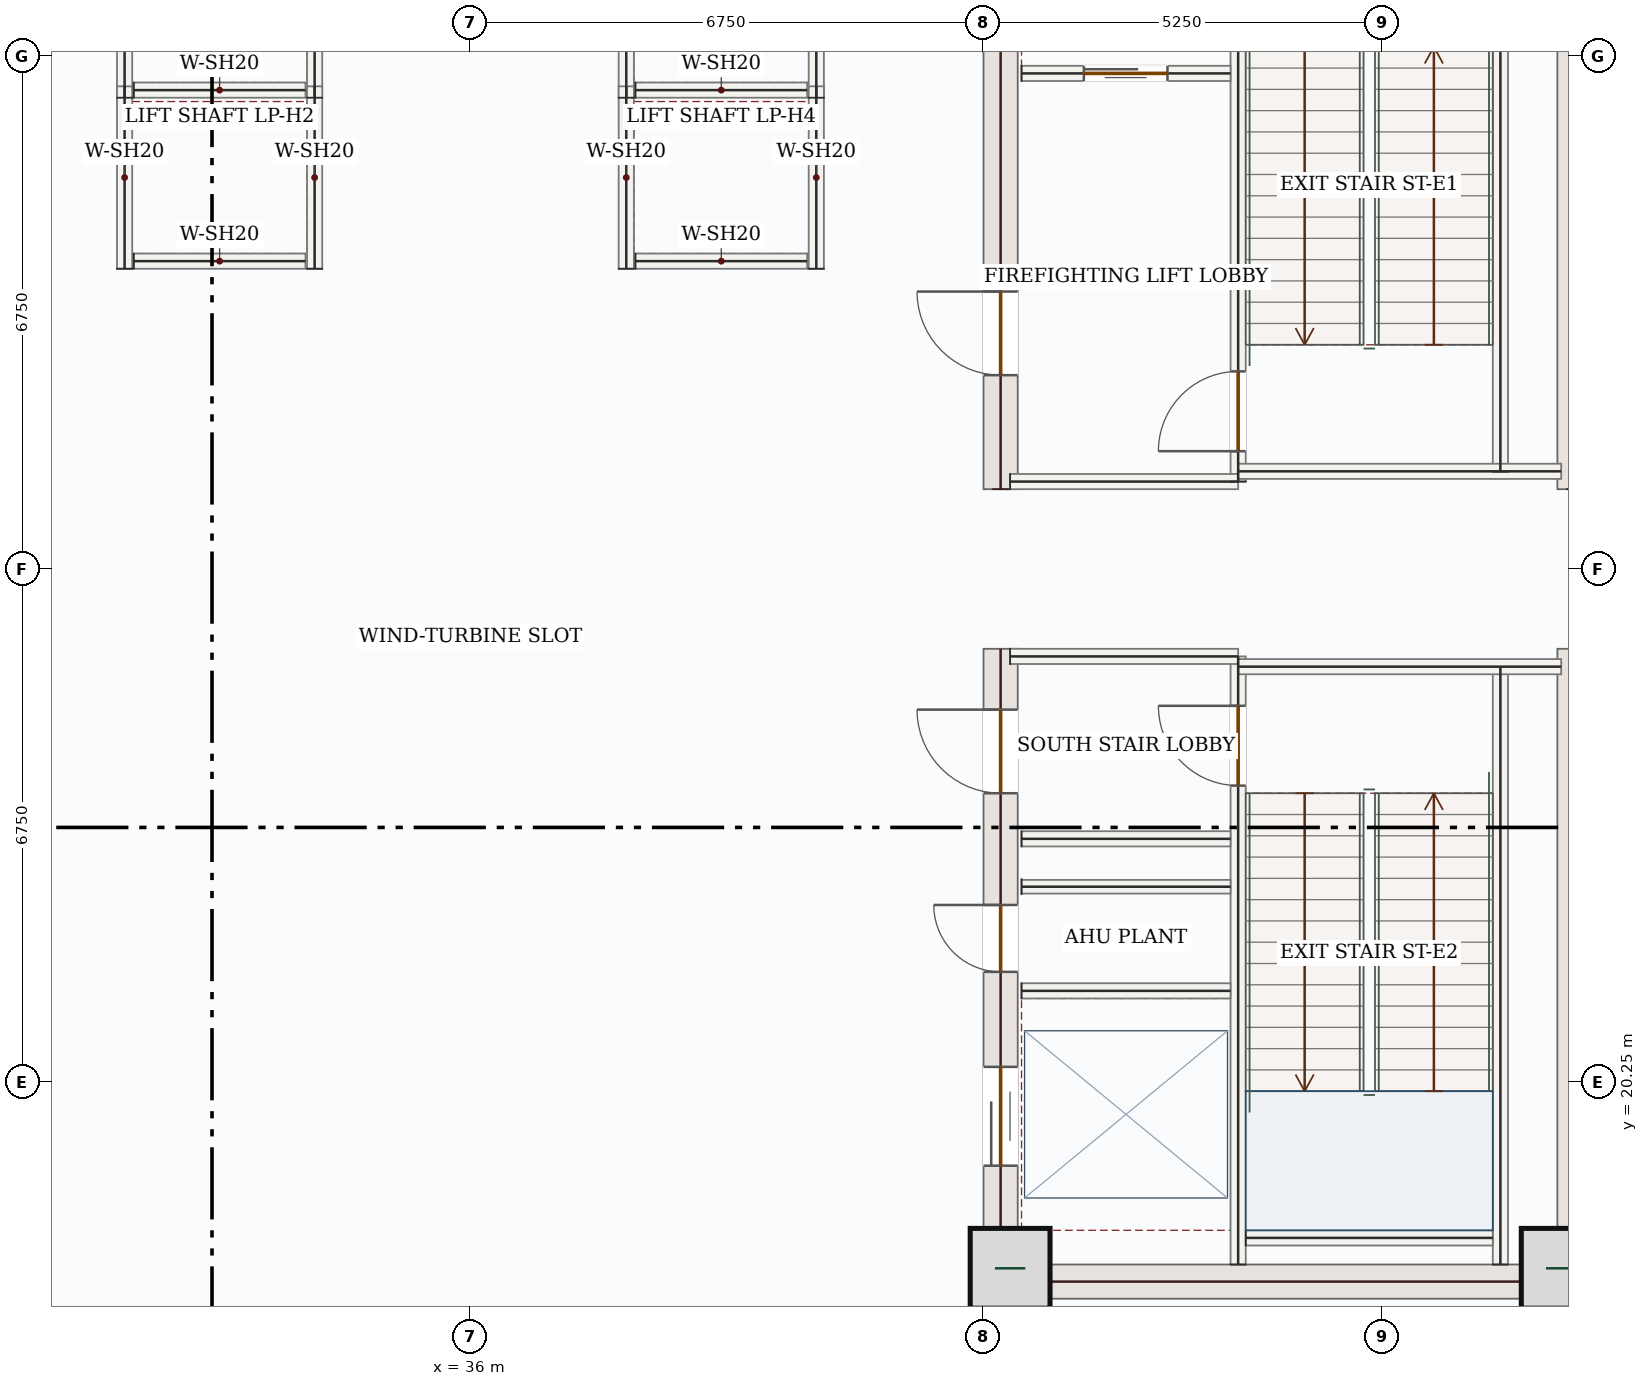
"""IFC4 building model, lengths in metres.
Left out: names, types, materials, properties, quantities, classifications, styles, units other than length and angle.
Written with IfcOpenShell. Run it as: python <this file> out.ifc"""

import sys

from ifc_helpers import new_model, si_unit, direction, frame, frame_2d, origin, origin_2d, place, context, subcontext, project, spatial, rectangle, extrude, source, transform, mapped, element, fill, save


model = new_model("IFC4")
c1 = context("Model", 3, precision=1e-05, world=origin(), true_north=direction((0.0, 1.0)))
c2 = subcontext(c1, "Body", "Model", "MODEL_VIEW")
j1 = project(units=[si_unit("LENGTHUNIT", "METRE"), si_unit("PLANEANGLEUNIT", "RADIAN")], contexts=[c1])
p1 = place(None, origin())
s1 = spatial("IfcSite", under=j1, at=p1, CompositionType="ELEMENT")
p2 = place(p1, origin())
s2 = spatial("IfcBuilding", under=s1, at=p2, CompositionType="ELEMENT")
p3 = place(p2, frame((0.0, 0.0, 314.1)))
s3 = spatial("IfcBuildingStorey", under=s2, at=p3, CompositionType="ELEMENT", Elevation=314.1)
p4 = place(p3, frame((42.975, 17.4, 0.0), z_axis=(0.0, 0.0, 1.0), x_axis=(0.0, 1.0, 0.0)))
e1 = element("IfcWall", 1, at=p4, inside=s3, PredefinedType="SHEAR", context=c2, shape_type="SweptSolid", body=[
    extrude(rectangle(XDim=8.55, YDim=0.45, at=frame_2d((4.275, 0.0))), origin(), (0.0, 0.0, 1.0), 5.45),
])
p5 = place(p4, frame((6.65, 0.0, 0.0)))
e2 = element("IfcOpeningElement", 2, at=p5, cuts=e1, PredefinedType="OPENING", context=c2, shape_type="SweptSolid", body=[
    extrude(rectangle(XDim=1.1, YDim=2.2, at=frame_2d((0.55, 1.1))), frame((0.0, 0.235, 0.0), z_axis=(0.0, -1.0, 0.0), x_axis=(1.0, 0.0, 0.0)), (0.0, 0.0, 1.0), 0.47),
])
p6 = place(p4, frame((1.75, 0.0, 0.0)))
e3 = element("IfcOpeningElement", 3, at=p6, cuts=e1, PredefinedType="OPENING", context=c2, shape_type="SweptSolid", body=[
    extrude(rectangle(XDim=1.3, YDim=2.2, at=frame_2d((0.65, 1.1))), frame((0.0, 0.235, 0.0), z_axis=(0.0, -1.0, 0.0), x_axis=(1.0, 0.0, 0.0)), (0.0, 0.0, 1.0), 0.47),
])
p7 = place(p4, frame((4.3, 0.0, 0.0)))
e4 = element("IfcOpeningElement", 4, at=p7, cuts=e1, PredefinedType="OPENING", context=c2, shape_type="SweptSolid", body=[
    extrude(rectangle(XDim=0.88, YDim=2.1, at=frame_2d((0.44, 1.05))), frame((0.0, 0.235, 0.0), z_axis=(0.0, -1.0, 0.0), x_axis=(1.0, 0.0, 0.0)), (0.0, 0.0, 1.0), 0.47),
])
p8 = place(p3, frame((42.975, 28.05, 0.0), z_axis=(0.0, 0.0, 1.0), x_axis=(0.0, 1.0, 0.0)))
e5 = element("IfcWall", 5, at=p8, inside=s3, PredefinedType="SHEAR", context=c2, shape_type="SweptSolid", body=[
    extrude(rectangle(XDim=8.55, YDim=0.45, at=frame_2d((4.275, 0.0))), origin(), (0.0, 0.0, 1.0), 5.45),
])
p9 = place(p8, frame((1.5, 0.0, 0.0)))
e6 = element("IfcOpeningElement", 6, at=p9, cuts=e5, PredefinedType="OPENING", context=c2, shape_type="SweptSolid", body=[
    extrude(rectangle(XDim=1.1, YDim=2.2, at=frame_2d((0.55, 1.1))), frame((0.0, 0.235, 0.0), z_axis=(0.0, -1.0, 0.0), x_axis=(1.0, 0.0, 0.0)), (0.0, 0.0, 1.0), 0.47),
])
m1 = source(origin(), c2, "Body", "SweptSolid", [
    extrude(rectangle(XDim=8.55, YDim=0.45, at=frame_2d((4.275, 0.0))), origin(), (0.0, 0.0, 1.0), 5.45),
])
for number, where, z_axis, x_axis in (
    (7, (50.525, 17.4, 0.0), (0.0, 0.0, 1.0), (0.0, 1.0, 0.0)),
    (8, (50.525, 28.05, 0.0), (0.0, 0.0, 1.0), (0.0, 1.0, 0.0)),
):
    element("IfcWall", number, at=place(p3, frame(where, z_axis=z_axis, x_axis=x_axis)), inside=s3, PredefinedType="SHEAR", context=c2, shape_type="MappedRepresentation", body=[
        mapped(m1, transform((0.0, 0.0, 0.0), x_axis=(1.0, 0.0, 0.0), y_axis=(0.0, 1.0, 0.0), z_axis=(0.0, 0.0, 1.0), scale=1.0)),
    ])
m2 = source(origin(), c2, "Body", "SweptSolid", [
    extrude(rectangle(XDim=7.1, YDim=0.45, at=frame_2d((3.55, 0.0))), origin(), (0.0, 0.0, 1.0), 5.45),
])
p10 = place(p3, frame((43.2, 17.625, 0.0), z_axis=(0.0, 0.0, 1.0), x_axis=(1.0, 0.0, 0.0)))
e9 = element("IfcWall", 9, at=p10, inside=s3, PredefinedType="SHEAR", context=c2, shape_type="MappedRepresentation", body=[
    mapped(m2, transform((0.0, 0.0, 0.0), x_axis=(1.0, 0.0, 0.0), y_axis=(0.0, 1.0, 0.0), z_axis=(0.0, 0.0, 1.0), scale=1.0)),
])
m3 = source(origin(), c2, "Body", "SweptSolid", [
    extrude(rectangle(XDim=1.05, YDim=1.05, at=origin_2d()), origin(), (0.0, 0.0, 1.0), 5.7),
])
for number, where, z_axis, x_axis in (
    (10, (43.1, 17.8, 0.0), (0.0, 0.0, 1.0), (1.0, 0.0, 0.0)),
    (11, (50.35, 17.8, 0.0), (0.0, 0.0, 1.0), (1.0, 0.0, 0.0)),
):
    element("IfcColumn", number, at=place(p3, frame(where, z_axis=z_axis, x_axis=x_axis)), inside=s3, PredefinedType="COLUMN", context=c2, shape_type="MappedRepresentation", body=[
        mapped(m3, transform((0.0, 0.0, 0.0), x_axis=(1.0, 0.0, 0.0), y_axis=(0.0, 1.0, 0.0), z_axis=(0.0, 0.0, 1.0), scale=1.0)),
    ])
m4 = source(origin(), c2, "Body", "SweptSolid", [
    extrude(rectangle(XDim=7.87, YDim=0.2, at=frame_2d((3.935, 0.0))), origin(), (0.0, 0.0, 1.0), 5.45),
])
for number, where, z_axis, x_axis in (
    (12, (49.55, 17.85, 0.0), (0.0, 0.0, 1.0), (0.0, 1.0, 0.0)),
    (13, (49.55, 28.28, 0.0), (0.0, 0.0, 1.0), (0.0, 1.0, 0.0)),
):
    element("IfcWall", number, at=place(p3, frame(where, z_axis=z_axis, x_axis=x_axis)), inside=s3, PredefinedType="SOLIDWALL", context=c2, shape_type="MappedRepresentation", body=[
        mapped(m4, transform((0.0, 0.0, 0.0), x_axis=(1.0, 0.0, 0.0), y_axis=(0.0, 1.0, 0.0), z_axis=(0.0, 0.0, 1.0), scale=1.0)),
    ])
p11 = place(p3, frame((46.1, 17.85, 0.0), z_axis=(0.0, 0.0, 1.0), x_axis=(0.0, 1.0, 0.0)))
e14 = element("IfcWall", 14, at=p11, inside=s3, PredefinedType="SOLIDWALL", context=c2, shape_type="SweptSolid", body=[
    extrude(rectangle(XDim=8.0, YDim=0.2, at=frame_2d((4.0, 0.0))), origin(), (0.0, 0.0, 1.0), 5.45),
])
p12 = place(p11, frame((6.3, 0.0, 0.0)))
e15 = element("IfcOpeningElement", 15, at=p12, cuts=e14, PredefinedType="OPENING", context=c2, shape_type="SweptSolid", body=[
    extrude(rectangle(XDim=1.05, YDim=2.15, at=frame_2d((0.525, 1.075))), frame((0.0, 0.11, 0.0), z_axis=(0.0, -1.0, 0.0), x_axis=(1.0, 0.0, 0.0)), (0.0, 0.0, 1.0), 0.22),
])
p13 = place(p3, frame((46.1, 28.15, 0.0), z_axis=(0.0, 0.0, 1.0), x_axis=(0.0, 1.0, 0.0)))
e16 = element("IfcWall", 16, at=p13, inside=s3, PredefinedType="SOLIDWALL", context=c2, shape_type="SweptSolid", body=[
    extrude(rectangle(XDim=8.0, YDim=0.2, at=frame_2d((4.0, 0.0))), origin(), (0.0, 0.0, 1.0), 5.45),
])
p14 = place(p13, frame((0.4, 0.0, 0.0)))
e17 = element("IfcOpeningElement", 17, at=p14, cuts=e16, PredefinedType="OPENING", context=c2, shape_type="SweptSolid", body=[
    extrude(rectangle(XDim=1.05, YDim=2.15, at=frame_2d((0.525, 1.075))), frame((0.0, 0.11, 0.0), z_axis=(0.0, -1.0, 0.0), x_axis=(1.0, 0.0, 0.0)), (0.0, 0.0, 1.0), 0.22),
])
m5 = source(origin(), c2, "Body", "SweptSolid", [
    extrude(rectangle(XDim=3.0, YDim=0.2, at=frame_2d((1.5, 0.0))), origin(), (0.0, 0.0, 1.0), 5.45),
])
p15 = place(p3, frame((43.1, 25.85, 0.0), z_axis=(0.0, 0.0, 1.0), x_axis=(1.0, 0.0, 0.0)))
e18 = element("IfcWall", 18, at=p15, inside=s3, PredefinedType="SOLIDWALL", context=c2, shape_type="MappedRepresentation", body=[
    mapped(m5, transform((0.0, 0.0, 0.0), x_axis=(1.0, 0.0, 0.0), y_axis=(0.0, 1.0, 0.0), z_axis=(0.0, 0.0, 1.0), scale=1.0)),
])
m6 = source(origin(), c2, "Body", "SweptSolid", [
    extrude(rectangle(XDim=4.25, YDim=0.2, at=frame_2d((2.125, 0.0))), origin(), (0.0, 0.0, 1.0), 5.45),
])
p16 = place(p3, frame((46.1, 25.715, 0.0), z_axis=(0.0, 0.0, 1.0), x_axis=(1.0, 0.0, 0.0)))
e19 = element("IfcWall", 19, at=p16, inside=s3, PredefinedType="SOLIDWALL", context=c2, shape_type="MappedRepresentation", body=[
    mapped(m6, transform((0.0, 0.0, 0.0), x_axis=(1.0, 0.0, 0.0), y_axis=(0.0, 1.0, 0.0), z_axis=(0.0, 0.0, 1.0), scale=1.0)),
])
p17 = place(p3, frame((43.1, 28.15, 0.0), z_axis=(0.0, 0.0, 1.0), x_axis=(1.0, 0.0, 0.0)))
e20 = element("IfcWall", 20, at=p17, inside=s3, PredefinedType="SOLIDWALL", context=c2, shape_type="MappedRepresentation", body=[
    mapped(m5, transform((0.0, 0.0, 0.0), x_axis=(1.0, 0.0, 0.0), y_axis=(0.0, 1.0, 0.0), z_axis=(0.0, 0.0, 1.0), scale=1.0)),
])
p18 = place(p3, frame((46.1, 28.285, 0.0), z_axis=(0.0, 0.0, 1.0), x_axis=(1.0, 0.0, 0.0)))
e21 = element("IfcWall", 21, at=p18, inside=s3, PredefinedType="SOLIDWALL", context=c2, shape_type="MappedRepresentation", body=[
    mapped(m6, transform((0.0, 0.0, 0.0), x_axis=(1.0, 0.0, 0.0), y_axis=(0.0, 1.0, 0.0), z_axis=(0.0, 0.0, 1.0), scale=1.0)),
])
m7 = source(origin(), c2, "Body", "SweptSolid", [
    extrude(rectangle(XDim=3.25, YDim=0.2, at=frame_2d((1.625, 0.0))), origin(), (0.0, 0.0, 1.0), 5.45),
])
p19 = place(p3, frame((46.2, 18.2, 0.0), z_axis=(0.0, 0.0, 1.0), x_axis=(1.0, 0.0, 0.0)))
e22 = element("IfcWall", 22, at=p19, inside=s3, PredefinedType="SOLIDWALL", context=c2, shape_type="MappedRepresentation", body=[
    mapped(m7, transform((0.0, 0.0, 0.0), x_axis=(1.0, 0.0, 0.0), y_axis=(0.0, 1.0, 0.0), z_axis=(0.0, 0.0, 1.0), scale=1.0)),
])
p20 = place(p3, frame((43.25, 33.52, 0.0), z_axis=(0.0, 0.0, 1.0), x_axis=(1.0, 0.0, 0.0)))
e23 = element("IfcWall", 23, at=p20, inside=s3, PredefinedType="SOLIDWALL", context=c2, shape_type="SweptSolid", body=[
    extrude(rectangle(XDim=2.75, YDim=0.2, at=frame_2d((1.375, 0.0))), origin(), (0.0, 0.0, 1.0), 5.45),
])
p21 = place(p20, frame((0.82, 0.0, 0.0)))
e24 = element("IfcOpeningElement", 24, at=p21, cuts=e23, PredefinedType="OPENING", context=c2, shape_type="SweptSolid", body=[
    extrude(rectangle(XDim=1.1, YDim=2.15, at=frame_2d((0.55, 1.075))), frame((0.0, 0.11, 0.0), z_axis=(0.0, -1.0, 0.0), x_axis=(1.0, 0.0, 0.0)), (0.0, 0.0, 1.0), 0.22),
])
m8 = source(origin(), c2, "Body", "SweptSolid", [
    extrude(rectangle(XDim=2.75, YDim=0.2, at=frame_2d((1.375, 0.0))), origin(), (0.0, 0.0, 1.0), 5.45),
])
for number, where, z_axis, x_axis in (
    (25, (43.25, 23.45, 0.0), (0.0, 0.0, 1.0), (1.0, 0.0, 0.0)),
    (26, (43.25, 21.45, 0.0), (0.0, 0.0, 1.0), (1.0, 0.0, 0.0)),
):
    element("IfcWall", number, at=place(p3, frame(where, z_axis=z_axis, x_axis=x_axis)), inside=s3, PredefinedType="SOLIDWALL", context=c2, shape_type="MappedRepresentation", body=[
        mapped(m8, transform((0.0, 0.0, 0.0), x_axis=(1.0, 0.0, 0.0), y_axis=(0.0, 1.0, 0.0), z_axis=(0.0, 0.0, 1.0), scale=1.0)),
    ])
m9 = source(origin(), c2, "Body", "SweptSolid", [
    extrude(rectangle(XDim=2.75, YDim=0.18, at=frame_2d((1.375, 0.0))), origin(), (0.0, 0.0, 1.0), 5.45),
])
p22 = place(p3, frame((43.25, 22.82, 0.0), z_axis=(0.0, 0.0, 1.0), x_axis=(1.0, 0.0, 0.0)))
e27 = element("IfcWall", 27, at=p22, inside=s3, PredefinedType="PARTITIONING", context=c2, shape_type="MappedRepresentation", body=[
    mapped(m9, transform((0.0, 0.0, 0.0), x_axis=(1.0, 0.0, 0.0), y_axis=(0.0, 1.0, 0.0), z_axis=(0.0, 0.0, 1.0), scale=1.0)),
])
m10 = source(origin(), c2, "Body", "SweptSolid", [
    extrude(rectangle(XDim=2.4, YDim=0.2, at=frame_2d((1.2, 0.0))), origin(), (0.0, 0.0, 1.0), 5.45),
])
for number, where, z_axis, x_axis in (
    (28, (31.45, 33.2, 0.0), (0.0, 0.0, 1.0), (0.0, 1.0, 0.0)),
    (29, (33.95, 33.2, 0.0), (0.0, 0.0, 1.0), (0.0, 1.0, 0.0)),
):
    element("IfcWall", number, at=place(p3, frame(where, z_axis=z_axis, x_axis=x_axis)), inside=s3, PredefinedType="SOLIDWALL", context=c2, shape_type="MappedRepresentation", body=[
        mapped(m10, transform((0.0, 0.0, 0.0), x_axis=(1.0, 0.0, 0.0), y_axis=(0.0, 1.0, 0.0), z_axis=(0.0, 0.0, 1.0), scale=1.0)),
    ])
m11 = source(origin(), c2, "Body", "SweptSolid", [
    extrude(rectangle(XDim=2.26, YDim=0.2, at=frame_2d((1.13, 0.0))), origin(), (0.0, 0.0, 1.0), 5.45),
])
p23 = place(p3, frame((31.57, 33.3, 0.0), z_axis=(0.0, 0.0, 1.0), x_axis=(1.0, 0.0, 0.0)))
e30 = element("IfcWall", 30, at=p23, inside=s3, PredefinedType="SOLIDWALL", context=c2, shape_type="MappedRepresentation", body=[
    mapped(m11, transform((0.0, 0.0, 0.0), x_axis=(1.0, 0.0, 0.0), y_axis=(0.0, 1.0, 0.0), z_axis=(0.0, 0.0, 1.0), scale=1.0)),
])
for number, where, z_axis, x_axis in (
    (31, (31.45, 30.95, 0.0), (0.0, 0.0, 1.0), (0.0, 1.0, 0.0)),
    (32, (33.95, 30.95, 0.0), (0.0, 0.0, 1.0), (0.0, 1.0, 0.0)),
):
    element("IfcWall", number, at=place(p3, frame(where, z_axis=z_axis, x_axis=x_axis)), inside=s3, PredefinedType="SOLIDWALL", context=c2, shape_type="MappedRepresentation", body=[
        mapped(m10, transform((0.0, 0.0, 0.0), x_axis=(1.0, 0.0, 0.0), y_axis=(0.0, 1.0, 0.0), z_axis=(0.0, 0.0, 1.0), scale=1.0)),
    ])
p24 = place(p3, frame((31.57, 31.05, 0.0), z_axis=(0.0, 0.0, 1.0), x_axis=(1.0, 0.0, 0.0)))
e33 = element("IfcWall", 33, at=p24, inside=s3, PredefinedType="SOLIDWALL", context=c2, shape_type="MappedRepresentation", body=[
    mapped(m11, transform((0.0, 0.0, 0.0), x_axis=(1.0, 0.0, 0.0), y_axis=(0.0, 1.0, 0.0), z_axis=(0.0, 0.0, 1.0), scale=1.0)),
])
for number, where, z_axis, x_axis in (
    (34, (38.05, 33.2, 0.0), (0.0, 0.0, 1.0), (0.0, 1.0, 0.0)),
    (35, (40.55, 33.2, 0.0), (0.0, 0.0, 1.0), (0.0, 1.0, 0.0)),
):
    element("IfcWall", number, at=place(p3, frame(where, z_axis=z_axis, x_axis=x_axis)), inside=s3, PredefinedType="SOLIDWALL", context=c2, shape_type="MappedRepresentation", body=[
        mapped(m10, transform((0.0, 0.0, 0.0), x_axis=(1.0, 0.0, 0.0), y_axis=(0.0, 1.0, 0.0), z_axis=(0.0, 0.0, 1.0), scale=1.0)),
    ])
p25 = place(p3, frame((38.17, 33.3, 0.0), z_axis=(0.0, 0.0, 1.0), x_axis=(1.0, 0.0, 0.0)))
e36 = element("IfcWall", 36, at=p25, inside=s3, PredefinedType="SOLIDWALL", context=c2, shape_type="MappedRepresentation", body=[
    mapped(m11, transform((0.0, 0.0, 0.0), x_axis=(1.0, 0.0, 0.0), y_axis=(0.0, 1.0, 0.0), z_axis=(0.0, 0.0, 1.0), scale=1.0)),
])
for number, where, z_axis, x_axis in (
    (37, (38.05, 30.95, 0.0), (0.0, 0.0, 1.0), (0.0, 1.0, 0.0)),
    (38, (40.55, 30.95, 0.0), (0.0, 0.0, 1.0), (0.0, 1.0, 0.0)),
):
    element("IfcWall", number, at=place(p3, frame(where, z_axis=z_axis, x_axis=x_axis)), inside=s3, PredefinedType="SOLIDWALL", context=c2, shape_type="MappedRepresentation", body=[
        mapped(m10, transform((0.0, 0.0, 0.0), x_axis=(1.0, 0.0, 0.0), y_axis=(0.0, 1.0, 0.0), z_axis=(0.0, 0.0, 1.0), scale=1.0)),
    ])
p26 = place(p3, frame((38.17, 31.05, 0.0), z_axis=(0.0, 0.0, 1.0), x_axis=(1.0, 0.0, 0.0)))
e39 = element("IfcWall", 39, at=p26, inside=s3, PredefinedType="SOLIDWALL", context=c2, shape_type="MappedRepresentation", body=[
    mapped(m11, transform((0.0, 0.0, 0.0), x_axis=(1.0, 0.0, 0.0), y_axis=(0.0, 1.0, 0.0), z_axis=(0.0, 0.0, 1.0), scale=1.0)),
])
m12 = source(origin(), c2, "Body", "SweptSolid", [
    extrude(rectangle(XDim=1.05, YDim=2.15, at=frame_2d((0.525, 1.075))), frame((0.0, 0.025, 0.0), z_axis=(0.0, -1.0, 0.0), x_axis=(1.0, 0.0, 0.0)), (0.0, 0.0, 1.0), 0.05),
])
p27 = place(p14, origin())
e40 = element("IfcDoor", 40, at=p27, inside=s3, OperationType="SINGLE_SWING_LEFT", PredefinedType="DOOR", context=c2, shape_type="MappedRepresentation", body=[
    mapped(m12, transform((0.0, 0.0, 0.0), x_axis=(1.0, 0.0, 0.0), y_axis=(0.0, 1.0, 0.0), z_axis=(0.0, 0.0, 1.0), scale=1.0)),
])
fill(e17, e40)
p28 = place(p12, origin())
e41 = element("IfcDoor", 41, at=p28, inside=s3, OperationType="SINGLE_SWING_RIGHT", PredefinedType="DOOR", context=c2, shape_type="MappedRepresentation", body=[
    mapped(m12, transform((0.0, 0.0, 0.0), x_axis=(1.0, 0.0, 0.0), y_axis=(0.0, 1.0, 0.0), z_axis=(0.0, 0.0, 1.0), scale=1.0)),
])
fill(e15, e41)
m13 = source(origin(), c2, "Body", "SweptSolid", [
    extrude(rectangle(XDim=1.1, YDim=2.15, at=frame_2d((0.55, 1.075))), frame((0.0, 0.025, 0.0), z_axis=(0.0, -1.0, 0.0), x_axis=(1.0, 0.0, 0.0)), (0.0, 0.0, 1.0), 0.05),
])
p29 = place(p21, origin())
e42 = element("IfcDoor", 42, at=p29, inside=s3, OperationType="DOUBLE_DOOR_SLIDING", PredefinedType="DOOR", context=c2, shape_type="MappedRepresentation", body=[
    mapped(m13, transform((0.0, 0.0, 0.0), x_axis=(1.0, 0.0, 0.0), y_axis=(0.0, 1.0, 0.0), z_axis=(0.0, 0.0, 1.0), scale=1.0)),
])
fill(e24, e42)
m14 = source(origin(), c2, "Body", "SweptSolid", [
    extrude(rectangle(XDim=1.1, YDim=2.2, at=frame_2d((0.55, 1.1))), frame((0.0, 0.025, 0.0), z_axis=(0.0, -1.0, 0.0), x_axis=(1.0, 0.0, 0.0)), (0.0, 0.0, 1.0), 0.05),
])
p30 = place(p9, origin())
e43 = element("IfcDoor", 43, at=p30, inside=s3, OperationType="SINGLE_SWING_RIGHT", PredefinedType="DOOR", context=c2, shape_type="MappedRepresentation", body=[
    mapped(m14, transform((0.0, 0.0, 0.0), x_axis=(1.0, 0.0, 0.0), y_axis=(0.0, 1.0, 0.0), z_axis=(0.0, 0.0, 1.0), scale=1.0)),
])
fill(e6, e43)
p31 = place(p5, origin())
e44 = element("IfcDoor", 44, at=p31, inside=s3, OperationType="SINGLE_SWING_RIGHT", PredefinedType="DOOR", context=c2, shape_type="MappedRepresentation", body=[
    mapped(m14, transform((0.0, 0.0, 0.0), x_axis=(1.0, 0.0, 0.0), y_axis=(0.0, 1.0, 0.0), z_axis=(0.0, 0.0, 1.0), scale=1.0)),
])
fill(e2, e44)
m15 = source(origin(), c2, "Body", "SweptSolid", [
    extrude(rectangle(XDim=1.3, YDim=2.2, at=frame_2d((0.65, 1.1))), frame((0.0, 0.025, 0.0), z_axis=(0.0, -1.0, 0.0), x_axis=(1.0, 0.0, 0.0)), (0.0, 0.0, 1.0), 0.05),
])
p32 = place(p6, origin())
e45 = element("IfcDoor", 45, at=p32, inside=s3, OperationType="DOUBLE_DOOR_SLIDING", PredefinedType="DOOR", context=c2, shape_type="MappedRepresentation", body=[
    mapped(m15, transform((0.0, 0.0, 0.0), x_axis=(1.0, 0.0, 0.0), y_axis=(0.0, 1.0, 0.0), z_axis=(0.0, 0.0, 1.0), scale=1.0)),
])
fill(e3, e45)
m16 = source(origin(), c2, "Body", "SweptSolid", [
    extrude(rectangle(XDim=0.88, YDim=2.1, at=frame_2d((0.44, 1.05))), frame((0.0, 0.025, 0.0), z_axis=(0.0, -1.0, 0.0), x_axis=(1.0, 0.0, 0.0)), (0.0, 0.0, 1.0), 0.05),
])
p33 = place(p7, origin())
e46 = element("IfcDoor", 46, at=p33, inside=s3, OperationType="SINGLE_SWING_RIGHT", PredefinedType="DOOR", context=c2, shape_type="MappedRepresentation", body=[
    mapped(m16, transform((0.0, 0.0, 0.0), x_axis=(1.0, 0.0, 0.0), y_axis=(0.0, 1.0, 0.0), z_axis=(0.0, 0.0, 1.0), scale=1.0)),
])
fill(e4, e46)
save(model, sys.argv[1])
